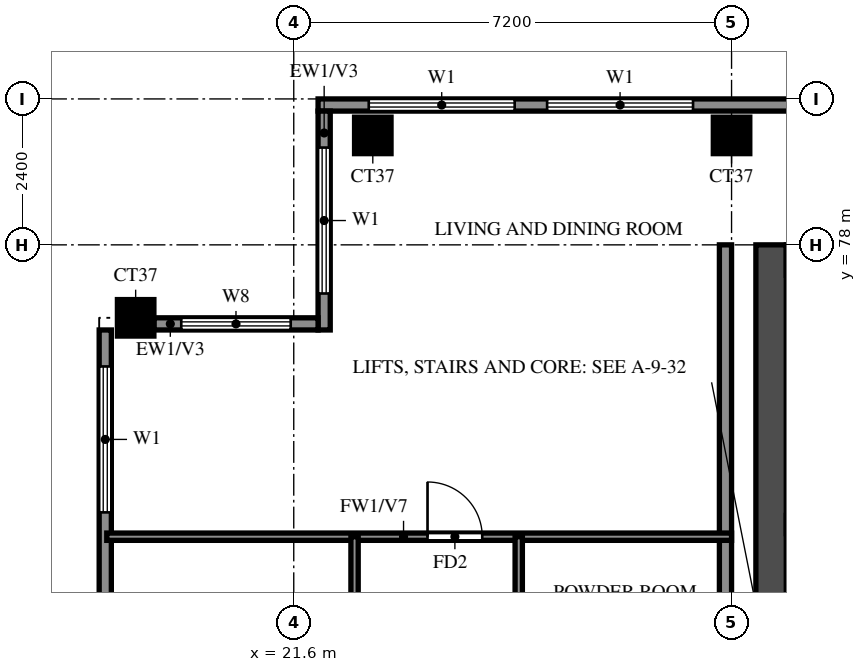
"""IFC4 building model, lengths in metres.
Left out: names, types, materials, properties, quantities, classifications, styles, units other than length and angle.
Written with IfcOpenShell. Run it as: python <this file> out.ifc"""

import sys

from ifc_helpers import new_model, si_unit, direction, frame, frame_2d, origin, origin_2d, place, context, subcontext, project, spatial, rectangle, extrude, source, transform, mapped, element, fill, save


model = new_model("IFC4")
c1 = context("Model", 3, precision=1e-05, world=origin(), true_north=direction((0.0, 1.0)))
c2 = subcontext(c1, "Body", "Model", "MODEL_VIEW")
j1 = project(units=[si_unit("LENGTHUNIT", "METRE"), si_unit("PLANEANGLEUNIT", "RADIAN")], contexts=[c1])
p1 = place(None, origin())
s1 = spatial("IfcSite", under=j1, at=p1, CompositionType="ELEMENT")
p2 = place(p1, origin())
s2 = spatial("IfcBuilding", under=s1, at=p2, CompositionType="ELEMENT")
p3 = place(p2, frame((0.0, 0.0, 257.0)))
s3 = spatial("IfcBuildingStorey", under=s2, at=p3, CompositionType="ELEMENT", Elevation=257.0)
m1 = source(origin(), c2, "Body", "SweptSolid", [
    extrude(rectangle(XDim=0.6, YDim=0.6, at=origin_2d()), origin(), (0.0, 0.0, 1.0), 3.22),
])
for number, where, z_axis, x_axis in (
    (1, (19.0, 76.8, 0.0), (0.0, 0.0, 1.0), (1.0, 0.0, 0.0)),
    (2, (22.9, 79.8, 0.0), (0.0, 0.0, 1.0), (1.0, 0.0, 0.0)),
    (3, (28.8, 79.8, 0.0), (0.0, 0.0, 1.0), (1.0, 0.0, 0.0)),
):
    element("IfcColumn", number, at=place(p3, frame(where, z_axis=z_axis, x_axis=x_axis)), inside=s3, PredefinedType="COLUMN", context=c2, shape_type="MappedRepresentation", body=[
        mapped(m1, transform((0.0, 0.0, 0.0))),
    ])
p4 = place(p3, frame((29.45, 66.15, 0.0), z_axis=(0.0, 0.0, 1.0), x_axis=(0.0, 1.0, 0.0)))
e4 = element("IfcWall", 4, at=p4, inside=s3, PredefinedType="SHEAR", context=c2, shape_type="SweptSolid", body=[
    extrude(rectangle(XDim=11.85, YDim=0.5, at=frame_2d((5.925, 0.0))), origin(), (0.0, 0.0, 1.0), 3.22),
])
p5 = place(p3, frame((78.6, 80.3, 0.0), z_axis=(0.0, 0.0, 1.0), x_axis=(-1.0, 0.0, 0.0)))
e5 = element("IfcWall", 5, at=p5, inside=s3, PredefinedType="SOLIDWALL", context=c2, shape_type="SweptSolid", body=[
    extrude(rectangle(XDim=56.6, YDim=0.2, at=frame_2d((28.3, 0.0))), origin(), (0.0, 0.0, 1.0), 3.22),
])
p6 = place(p5, frame((3.9, 0.0, 0.0)))
e6 = element("IfcOpeningElement", 6, at=p6, cuts=e5, PredefinedType="OPENING", context=c2, shape_type="SweptSolid", body=[
    extrude(rectangle(XDim=1.8, YDim=2.4, at=frame_2d((0.9, 1.2))), frame((0.0, 0.11, 0.0), z_axis=(0.0, -1.0, 0.0), x_axis=(1.0, 0.0, 0.0)), (0.0, 0.0, 1.0), 0.22),
])
p7 = place(p5, frame((50.433, 0.0, 0.6)))
e7 = element("IfcOpeningElement", 7, at=p7, cuts=e5, PredefinedType="OPENING", context=c2, shape_type="SweptSolid", body=[
    extrude(rectangle(XDim=2.4, YDim=2.4, at=frame_2d((1.2, 1.2))), frame((0.0, 0.11, 0.0), z_axis=(0.0, -1.0, 0.0), x_axis=(1.0, 0.0, 0.0)), (0.0, 0.0, 1.0), 0.22),
])
p8 = place(p5, frame((53.367, 0.0, 0.6)))
e8 = element("IfcOpeningElement", 8, at=p8, cuts=e5, PredefinedType="OPENING", context=c2, shape_type="SweptSolid", body=[
    extrude(rectangle(XDim=2.4, YDim=2.4, at=frame_2d((1.2, 1.2))), frame((0.0, 0.11, 0.0), z_axis=(0.0, -1.0, 0.0), x_axis=(1.0, 0.0, 0.0)), (0.0, 0.0, 1.0), 0.22),
])
p9 = place(p5, frame((0.4, 0.0, 0.6)))
e9 = element("IfcOpeningElement", 9, at=p9, cuts=e5, PredefinedType="OPENING", context=c2, shape_type="SweptSolid", body=[
    extrude(rectangle(XDim=1.2, YDim=2.4, at=frame_2d((0.6, 1.2))), frame((0.0, 0.11, 0.0), z_axis=(0.0, -1.0, 0.0), x_axis=(1.0, 0.0, 0.0)), (0.0, 0.0, 1.0), 0.22),
])
p10 = place(p5, frame((2.55, 0.0, 0.6)))
e10 = element("IfcOpeningElement", 10, at=p10, cuts=e5, PredefinedType="OPENING", context=c2, shape_type="SweptSolid", body=[
    extrude(rectangle(XDim=0.9, YDim=2.4, at=frame_2d((0.45, 1.2))), frame((0.0, 0.11, 0.0), z_axis=(0.0, -1.0, 0.0), x_axis=(1.0, 0.0, 0.0)), (0.0, 0.0, 1.0), 0.22),
])
p11 = place(p3, frame((22.1, 80.2, 0.0), z_axis=(0.0, 0.0, 1.0), x_axis=(0.0, -1.0, 0.0)))
e11 = element("IfcWall", 11, at=p11, inside=s3, PredefinedType="SOLIDWALL", context=c2, shape_type="SweptSolid", body=[
    extrude(rectangle(XDim=3.6, YDim=0.2, at=frame_2d((1.8, 0.0))), origin(), (0.0, 0.0, 1.0), 3.22),
])
p12 = place(p11, frame((0.6, 0.0, 0.6)))
e12 = element("IfcOpeningElement", 12, at=p12, cuts=e11, PredefinedType="OPENING", context=c2, shape_type="SweptSolid", body=[
    extrude(rectangle(XDim=2.4, YDim=2.4, at=frame_2d((1.2, 1.2))), frame((0.0, 0.11, 0.0), z_axis=(0.0, -1.0, 0.0), x_axis=(1.0, 0.0, 0.0)), (0.0, 0.0, 1.0), 0.22),
])
p13 = place(p3, frame((22.0, 76.7, 0.0), z_axis=(0.0, 0.0, 1.0), x_axis=(-1.0, 0.0, 0.0)))
e13 = element("IfcWall", 13, at=p13, inside=s3, PredefinedType="SOLIDWALL", context=c2, shape_type="SweptSolid", body=[
    extrude(rectangle(XDim=2.7, YDim=0.2, at=frame_2d((1.35, 0.0))), origin(), (0.0, 0.0, 1.0), 3.22),
])
p14 = place(p13, frame((0.45, 0.0, 0.6)))
e14 = element("IfcOpeningElement", 14, at=p14, cuts=e13, PredefinedType="OPENING", context=c2, shape_type="SweptSolid", body=[
    extrude(rectangle(XDim=1.8, YDim=2.4, at=frame_2d((0.9, 1.2))), frame((0.0, 0.11, 0.0), z_axis=(0.0, -1.0, 0.0), x_axis=(1.0, 0.0, 0.0)), (0.0, 0.0, 1.0), 0.22),
])
p15 = place(p3, frame((18.5, 76.6, 0.0), z_axis=(0.0, 0.0, 1.0), x_axis=(0.0, -1.0, 0.0)))
e15 = element("IfcWall", 15, at=p15, inside=s3, PredefinedType="SOLIDWALL", context=c2, shape_type="SweptSolid", body=[
    extrude(rectangle(XDim=14.2, YDim=0.2, at=frame_2d((7.1, 0.0))), origin(), (0.0, 0.0, 1.0), 3.22),
])
p16 = place(p15, frame((7.767, 0.0, 0.6)))
e16 = element("IfcOpeningElement", 16, at=p16, cuts=e15, PredefinedType="OPENING", context=c2, shape_type="SweptSolid", body=[
    extrude(rectangle(XDim=2.4, YDim=2.4, at=frame_2d((1.2, 1.2))), frame((0.0, 0.11, 0.0), z_axis=(0.0, -1.0, 0.0), x_axis=(1.0, 0.0, 0.0)), (0.0, 0.0, 1.0), 0.22),
])
p17 = place(p15, frame((10.833, 0.0, 0.6)))
e17 = element("IfcOpeningElement", 17, at=p17, cuts=e15, PredefinedType="OPENING", context=c2, shape_type="SweptSolid", body=[
    extrude(rectangle(XDim=2.4, YDim=2.4, at=frame_2d((1.2, 1.2))), frame((0.0, 0.11, 0.0), z_axis=(0.0, -1.0, 0.0), x_axis=(1.0, 0.0, 0.0)), (0.0, 0.0, 1.0), 0.22),
])
p18 = place(p15, frame((4.75, 0.0, 1.5)))
e18 = element("IfcOpeningElement", 18, at=p18, cuts=e15, PredefinedType="OPENING", context=c2, shape_type="SweptSolid", body=[
    extrude(rectangle(XDim=0.9, YDim=0.9, at=frame_2d((0.45, 0.45))), frame((0.0, 0.11, 0.0), z_axis=(0.0, -1.0, 0.0), x_axis=(1.0, 0.0, 0.0)), (0.0, 0.0, 1.0), 0.22),
])
p19 = place(p15, frame((0.6, 0.0, 0.6)))
e19 = element("IfcOpeningElement", 19, at=p19, cuts=e15, PredefinedType="OPENING", context=c2, shape_type="SweptSolid", body=[
    extrude(rectangle(XDim=2.4, YDim=2.4, at=frame_2d((1.2, 1.2))), frame((0.0, 0.11, 0.0), z_axis=(0.0, -1.0, 0.0), x_axis=(1.0, 0.0, 0.0)), (0.0, 0.0, 1.0), 0.22),
])
p20 = place(p3, frame((28.7, 62.4, 0.0), z_axis=(0.0, 0.0, 1.0), x_axis=(0.0, 1.0, 0.0)))
e20 = element("IfcWall", 20, at=p20, inside=s3, PredefinedType="SOLIDWALL", context=c2, shape_type="SweptSolid", body=[
    extrude(rectangle(XDim=15.6, YDim=0.2, at=frame_2d((7.8, 0.0))), origin(), (0.0, 0.0, 1.0), 3.22),
])
p21 = place(p3, frame((18.525, 73.2, 0.0), z_axis=(0.0, 0.0, 1.0), x_axis=(1.0, 0.0, 0.0)))
e21 = element("IfcWall", 21, at=p21, inside=s3, PredefinedType="PARTITIONING", context=c2, shape_type="SweptSolid", body=[
    extrude(rectangle(XDim=10.275, YDim=0.12, at=frame_2d((5.138, 0.0))), origin(), (0.0, 0.0, 1.0), 2.32),
])
p22 = place(p21, frame((5.275, 0.0, 0.0)))
e22 = element("IfcOpeningElement", 22, at=p22, cuts=e21, PredefinedType="OPENING", context=c2, shape_type="SweptSolid", body=[
    extrude(rectangle(XDim=0.9, YDim=2.1, at=frame_2d((0.45, 1.05))), frame((0.0, 0.07, 0.0), z_axis=(0.0, -1.0, 0.0), x_axis=(1.0, 0.0, 0.0)), (0.0, 0.0, 1.0), 0.14),
])
p23 = place(p3, frame((22.6, 69.6, 0.0), z_axis=(0.0, 0.0, 1.0), x_axis=(0.0, 1.0, 0.0)))
e23 = element("IfcWall", 23, at=p23, inside=s3, PredefinedType="PARTITIONING", context=c2, shape_type="SweptSolid", body=[
    extrude(rectangle(XDim=3.6, YDim=0.12, at=frame_2d((1.8, 0.0))), origin(), (0.0, 0.0, 1.0), 3.22),
])
p24 = place(p3, frame((25.3, 61.2, 0.0), z_axis=(0.0, 0.0, 1.0), x_axis=(0.0, 1.0, 0.0)))
e24 = element("IfcWall", 24, at=p24, inside=s3, PredefinedType="PARTITIONING", context=c2, shape_type="SweptSolid", body=[
    extrude(rectangle(XDim=12.0, YDim=0.12, at=frame_2d((6.0, 0.0))), origin(), (0.0, 0.0, 1.0), 3.22),
])
p25 = place(p24, frame((5.3, 0.0, 0.0)))
e25 = element("IfcOpeningElement", 25, at=p25, cuts=e24, PredefinedType="OPENING", context=c2, shape_type="SweptSolid", body=[
    extrude(rectangle(XDim=0.9, YDim=2.1, at=frame_2d((0.45, 1.05))), frame((0.0, 0.07, 0.0), z_axis=(0.0, -1.0, 0.0), x_axis=(1.0, 0.0, 0.0)), (0.0, 0.0, 1.0), 0.14),
])
p26 = place(p24, frame((9.7, 0.0, 0.0)))
e26 = element("IfcOpeningElement", 26, at=p26, cuts=e24, PredefinedType="OPENING", context=c2, shape_type="SweptSolid", body=[
    extrude(rectangle(XDim=0.8, YDim=2.1, at=frame_2d((0.4, 1.05))), frame((0.0, 0.07, 0.0), z_axis=(0.0, -1.0, 0.0), x_axis=(1.0, 0.0, 0.0)), (0.0, 0.0, 1.0), 0.14),
])
p27 = place(p7, origin())
e27 = element("IfcWindow", 27, at=p27, inside=s3, PartitioningType="DOUBLE_PANEL_VERTICAL", PredefinedType="WINDOW", context=c2, shape_type="SweptSolid", body=[
    extrude(rectangle(XDim=2.4, YDim=2.4, at=frame_2d((1.2, 1.2))), frame((0.0, 0.03, 0.0), z_axis=(0.0, -1.0, 0.0), x_axis=(1.0, 0.0, 0.0)), (0.0, 0.0, 1.0), 0.06),
])
fill(e7, e27)
p28 = place(p8, origin())
e28 = element("IfcWindow", 28, at=p28, inside=s3, PartitioningType="DOUBLE_PANEL_VERTICAL", PredefinedType="WINDOW", context=c2, shape_type="SweptSolid", body=[
    extrude(rectangle(XDim=2.4, YDim=2.4, at=frame_2d((1.2, 1.2))), frame((0.0, 0.03, 0.0), z_axis=(0.0, -1.0, 0.0), x_axis=(1.0, 0.0, 0.0)), (0.0, 0.0, 1.0), 0.06),
])
fill(e8, e28)
p29 = place(p12, origin())
e29 = element("IfcWindow", 29, at=p29, inside=s3, PartitioningType="DOUBLE_PANEL_VERTICAL", PredefinedType="WINDOW", context=c2, shape_type="SweptSolid", body=[
    extrude(rectangle(XDim=2.4, YDim=2.4, at=frame_2d((1.2, 1.2))), frame((0.0, 0.03, 0.0), z_axis=(0.0, -1.0, 0.0), x_axis=(1.0, 0.0, 0.0)), (0.0, 0.0, 1.0), 0.06),
])
fill(e12, e29)
p30 = place(p14, origin())
e30 = element("IfcWindow", 30, at=p30, inside=s3, PartitioningType="DOUBLE_PANEL_VERTICAL", PredefinedType="WINDOW", context=c2, shape_type="SweptSolid", body=[
    extrude(rectangle(XDim=1.8, YDim=2.4, at=frame_2d((0.9, 1.2))), frame((0.0, 0.03, 0.0), z_axis=(0.0, -1.0, 0.0), x_axis=(1.0, 0.0, 0.0)), (0.0, 0.0, 1.0), 0.06),
])
fill(e14, e30)
p31 = place(p19, origin())
e31 = element("IfcWindow", 31, at=p31, inside=s3, PartitioningType="DOUBLE_PANEL_VERTICAL", PredefinedType="WINDOW", context=c2, shape_type="SweptSolid", body=[
    extrude(rectangle(XDim=2.4, YDim=2.4, at=frame_2d((1.2, 1.2))), frame((0.0, 0.03, 0.0), z_axis=(0.0, -1.0, 0.0), x_axis=(1.0, 0.0, 0.0)), (0.0, 0.0, 1.0), 0.06),
])
fill(e19, e31)
p32 = place(p22, origin())
e32 = element("IfcDoor", 32, at=p32, inside=s3, OperationType="SINGLE_SWING_RIGHT", PredefinedType="DOOR", context=c2, shape_type="SweptSolid", body=[
    extrude(rectangle(XDim=0.9, YDim=2.1, at=frame_2d((0.45, 1.05))), frame((0.0, 0.025, 0.0), z_axis=(0.0, -1.0, 0.0), x_axis=(1.0, 0.0, 0.0)), (0.0, 0.0, 1.0), 0.05),
])
fill(e22, e32)
save(model, sys.argv[1])
